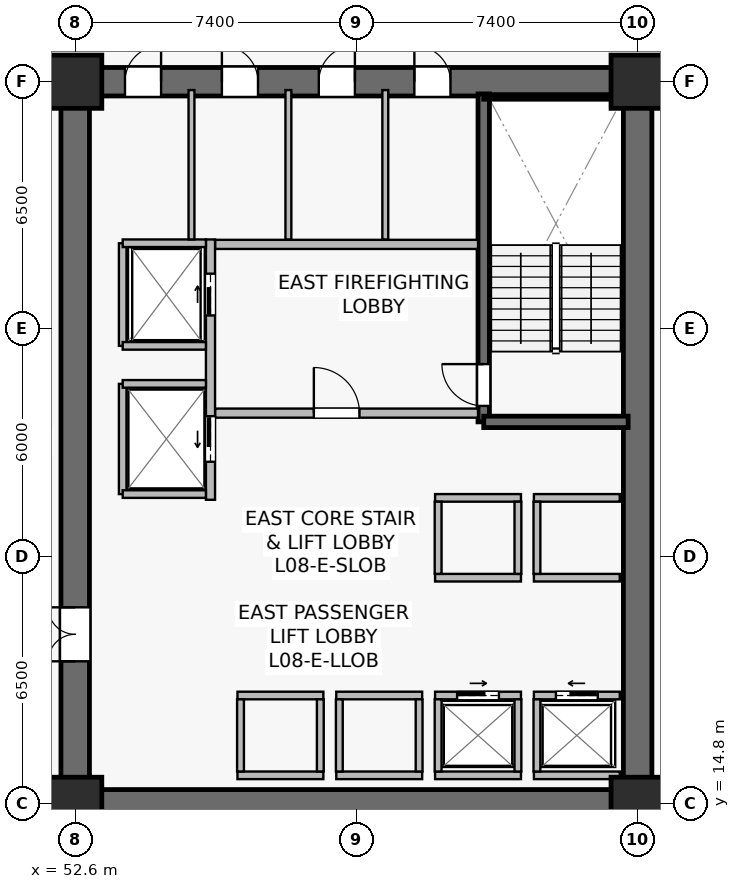
"""IFC4 building model, lengths in metres.
Left out: names, types, materials, properties, quantities, classifications, styles, units other than length and angle.
Written with IfcOpenShell. Run it as: python <this file> out.ifc"""

import sys

from ifc_helpers import new_model, si_unit, direction, frame, frame_2d, origin, origin_2d, place, context, subcontext, project, spatial, rectangle, extrude, source, transform, mapped, element, fill, save


model = new_model("IFC4")
c1 = context("Model", 3, precision=1e-05, world=origin(), true_north=direction((0.0, 1.0)))
c2 = subcontext(c1, "Body", "Model", "MODEL_VIEW")
j1 = project(units=[si_unit("LENGTHUNIT", "METRE"), si_unit("PLANEANGLEUNIT", "RADIAN")], contexts=[c1])
p1 = place(None, origin())
s1 = spatial("IfcSite", under=j1, at=p1, CompositionType="ELEMENT")
p2 = place(p1, origin())
s2 = spatial("IfcBuilding", under=s1, at=p2, CompositionType="ELEMENT")
p3 = place(p2, frame((0.0, 0.0, 33.4)))
s3 = spatial("IfcBuildingStorey", under=s2, at=p3, CompositionType="ELEMENT", Elevation=33.4)
p4 = place(p3, frame((52.225, 14.8, 0.0), z_axis=(0.0, 0.0, 1.0), x_axis=(1.0, 0.0, 0.0)))
e1 = element("IfcWall", 1, at=p4, inside=s3, PredefinedType="SHEAR", context=c2, shape_type="SweptSolid", body=[
    extrude(rectangle(XDim=15.55, YDim=0.75, at=frame_2d((7.775, 0.0))), origin(), (0.0, 0.0, 1.0), 3.78),
])
p5 = place(p3, frame((52.225, 33.8, 0.0), z_axis=(0.0, 0.0, 1.0), x_axis=(1.0, 0.0, 0.0)))
e2 = element("IfcWall", 2, at=p5, inside=s3, PredefinedType="SHEAR", context=c2, shape_type="SweptSolid", body=[
    extrude(rectangle(XDim=15.55, YDim=0.75, at=frame_2d((7.775, 0.0))), origin(), (0.0, 0.0, 1.0), 3.78),
])
p6 = place(p5, frame((9.3, 0.0, 0.0)))
e3 = element("IfcOpeningElement", 3, at=p6, cuts=e2, PredefinedType="OPENING", context=c2, shape_type="SweptSolid", body=[
    extrude(rectangle(XDim=0.95, YDim=2.15, at=frame_2d((0.475, 1.075))), frame((0.0, 0.385, 0.0), z_axis=(0.0, -1.0, 0.0), x_axis=(1.0, 0.0, 0.0)), (0.0, 0.0, 1.0), 0.77),
])
p7 = place(p5, frame((6.785, 0.0, 0.0)))
e4 = element("IfcOpeningElement", 4, at=p7, cuts=e2, PredefinedType="OPENING", context=c2, shape_type="SweptSolid", body=[
    extrude(rectangle(XDim=0.95, YDim=2.15, at=frame_2d((0.475, 1.075))), frame((0.0, 0.385, 0.0), z_axis=(0.0, -1.0, 0.0), x_axis=(1.0, 0.0, 0.0)), (0.0, 0.0, 1.0), 0.77),
])
p8 = place(p5, frame((4.235, 0.0, 0.0)))
e5 = element("IfcOpeningElement", 5, at=p8, cuts=e2, PredefinedType="OPENING", context=c2, shape_type="SweptSolid", body=[
    extrude(rectangle(XDim=0.95, YDim=2.15, at=frame_2d((0.475, 1.075))), frame((0.0, 0.385, 0.0), z_axis=(0.0, -1.0, 0.0), x_axis=(1.0, 0.0, 0.0)), (0.0, 0.0, 1.0), 0.77),
])
p9 = place(p5, frame((1.685, 0.0, 0.0)))
e6 = element("IfcOpeningElement", 6, at=p9, cuts=e2, PredefinedType="OPENING", context=c2, shape_type="SweptSolid", body=[
    extrude(rectangle(XDim=0.95, YDim=2.15, at=frame_2d((0.475, 1.075))), frame((0.0, 0.385, 0.0), z_axis=(0.0, -1.0, 0.0), x_axis=(1.0, 0.0, 0.0)), (0.0, 0.0, 1.0), 0.77),
])
p10 = place(p3, frame((52.6, 15.175, 0.0), z_axis=(0.0, 0.0, 1.0), x_axis=(0.0, 1.0, 0.0)))
e7 = element("IfcWall", 7, at=p10, inside=s3, PredefinedType="SHEAR", context=c2, shape_type="SweptSolid", body=[
    extrude(rectangle(XDim=18.25, YDim=0.75, at=frame_2d((9.125, 0.0))), origin(), (0.0, 0.0, 1.0), 3.78),
])
p11 = place(p10, frame((3.375, 0.0, 0.0)))
e8 = element("IfcOpeningElement", 8, at=p11, cuts=e7, PredefinedType="OPENING", context=c2, shape_type="SweptSolid", body=[
    extrude(rectangle(XDim=1.42, YDim=2.2, at=frame_2d((0.71, 1.1))), frame((0.0, 0.385, 0.0), z_axis=(0.0, -1.0, 0.0), x_axis=(1.0, 0.0, 0.0)), (0.0, 0.0, 1.0), 0.77),
])
p12 = place(p3, frame((67.4, 15.175, 0.0), z_axis=(0.0, 0.0, 1.0), x_axis=(0.0, 1.0, 0.0)))
e9 = element("IfcWall", 9, at=p12, inside=s3, PredefinedType="SHEAR", context=c2, shape_type="SweptSolid", body=[
    extrude(rectangle(XDim=18.25, YDim=0.75, at=frame_2d((9.125, 0.0))), origin(), (0.0, 0.0, 1.0), 3.78),
])
p13 = place(p3, frame((63.35, 24.85, 0.0), z_axis=(0.0, 0.0, 1.0), x_axis=(0.0, 1.0, 0.0)))
e10 = element("IfcWall", 10, at=p13, inside=s3, PredefinedType="SHEAR", context=c2, shape_type="SweptSolid", body=[
    extrude(rectangle(XDim=8.63, YDim=0.3, at=frame_2d((4.315, 0.0))), origin(), (0.0, 0.0, 1.0), 3.78),
])
p14 = place(p13, frame((0.42, 0.0, 0.0)))
e11 = element("IfcOpeningElement", 11, at=p14, cuts=e10, PredefinedType="OPENING", context=c2, shape_type="SweptSolid", body=[
    extrude(rectangle(XDim=1.1, YDim=2.15, at=frame_2d((0.55, 1.075))), frame((0.0, 0.16, 0.0), z_axis=(0.0, -1.0, 0.0), x_axis=(1.0, 0.0, 0.0)), (0.0, 0.0, 1.0), 0.32),
])
p15 = place(p3, frame((63.35, 24.85, 0.0), z_axis=(0.0, 0.0, 1.0), x_axis=(1.0, 0.0, 0.0)))
e12 = element("IfcWall", 12, at=p15, inside=s3, PredefinedType="SHEAR", context=c2, shape_type="SweptSolid", body=[
    extrude(rectangle(XDim=3.8, YDim=0.3, at=frame_2d((1.9, 0.0))), origin(), (0.0, 0.0, 1.0), 3.78),
])
p16 = place(p3, frame((63.35, 33.4, 0.0), z_axis=(0.0, 0.0, 1.0), x_axis=(1.0, 0.0, 0.0)))
e13 = element("IfcWall", 13, at=p16, inside=s3, PredefinedType="SOLIDWALL", context=c2, shape_type="SweptSolid", body=[
    extrude(rectangle(XDim=3.72, YDim=0.12, at=frame_2d((1.86, 0.0))), origin(), (0.0, 0.0, 1.0), 3.78),
])
m1 = source(origin(), c2, "Body", "SweptSolid", [
    extrude(rectangle(XDim=1.4, YDim=1.4, at=origin_2d()), origin(), (0.0, 0.0, 1.0), 4.1),
])
for number, where, z_axis, x_axis in (
    (14, (52.6, 14.8, 0.0), (0.0, 0.0, 1.0), (1.0, 0.0, 0.0)),
    (15, (67.4, 14.8, 0.0), (0.0, 0.0, 1.0), (1.0, 0.0, 0.0)),
    (16, (52.6, 33.8, 0.0), (0.0, 0.0, 1.0), (1.0, 0.0, 0.0)),
    (17, (67.4, 33.8, 0.0), (0.0, 0.0, 1.0), (1.0, 0.0, 0.0)),
):
    element("IfcColumn", number, at=place(p3, frame(where, z_axis=z_axis, x_axis=x_axis)), inside=s3, PredefinedType="COLUMN", context=c2, shape_type="MappedRepresentation", body=[
        mapped(m1, transform((0.0, 0.0, 0.0), scale=1.0)),
    ])
p17 = place(p3, frame((56.28, 25.08, 0.0), z_axis=(0.0, 0.0, 1.0), x_axis=(1.0, 0.0, 0.0)))
e18 = element("IfcWall", 18, at=p17, inside=s3, PredefinedType="SOLIDWALL", context=c2, shape_type="SweptSolid", body=[
    extrude(rectangle(XDim=6.92, YDim=0.24, at=frame_2d((3.46, 0.0))), origin(), (0.0, 0.0, 1.0), 3.065),
])
p18 = place(p17, frame((2.6, 0.0, 0.0)))
e19 = element("IfcOpeningElement", 19, at=p18, cuts=e18, PredefinedType="OPENING", context=c2, shape_type="SweptSolid", body=[
    extrude(rectangle(XDim=1.2, YDim=2.16, at=frame_2d((0.6, 1.08))), frame((0.0, 0.13, 0.0), z_axis=(0.0, -1.0, 0.0), x_axis=(1.0, 0.0, 0.0)), (0.0, 0.0, 1.0), 0.26),
])
p19 = place(p3, frame((56.28, 29.52, 0.0), z_axis=(0.0, 0.0, 1.0), x_axis=(1.0, 0.0, 0.0)))
e20 = element("IfcWall", 20, at=p19, inside=s3, PredefinedType="SOLIDWALL", context=c2, shape_type="SweptSolid", body=[
    extrude(rectangle(XDim=6.92, YDim=0.24, at=frame_2d((3.46, 0.0))), origin(), (0.0, 0.0, 1.0), 3.065),
])
p20 = place(p3, frame((56.16, 22.8, 0.0), z_axis=(0.0, 0.0, 1.0), x_axis=(0.0, 1.0, 0.0)))
e21 = element("IfcWall", 21, at=p20, inside=s3, PredefinedType="SOLIDWALL", context=c2, shape_type="SweptSolid", body=[
    extrude(rectangle(XDim=6.85, YDim=0.24, at=frame_2d((3.425, 0.0))), origin(), (0.0, 0.0, 1.0), 2.865),
])
p21 = place(p20, frame((4.85, 0.0, 0.0)))
e22 = element("IfcOpeningElement", 22, at=p21, cuts=e21, PredefinedType="OPENING", context=c2, shape_type="SweptSolid", body=[
    extrude(rectangle(XDim=1.1, YDim=2.22, at=frame_2d((0.55, 1.11))), frame((0.0, 0.13, 0.0), z_axis=(0.0, -1.0, 0.0), x_axis=(1.0, 0.0, 0.0)), (0.0, 0.0, 1.0), 0.26),
])
p22 = place(p20, frame((1.0, 0.0, 0.0)))
e23 = element("IfcOpeningElement", 23, at=p22, cuts=e21, PredefinedType="OPENING", context=c2, shape_type="SweptSolid", body=[
    extrude(rectangle(XDim=1.2, YDim=2.22, at=frame_2d((0.6, 1.11))), frame((0.0, 0.13, 0.0), z_axis=(0.0, -1.0, 0.0), x_axis=(1.0, 0.0, 0.0)), (0.0, 0.0, 1.0), 0.26),
])
p23 = place(p3, frame((64.67, 17.65, 0.0), z_axis=(0.0, 0.0, 1.0), x_axis=(1.0, 0.0, 0.0)))
e24 = element("IfcWall", 24, at=p23, inside=s3, PredefinedType="SOLIDWALL", context=c2, shape_type="SweptSolid", body=[
    extrude(rectangle(XDim=2.26, YDim=0.2, at=frame_2d((1.13, 0.0))), origin(), (0.0, 0.0, 1.0), 3.78),
])
p24 = place(p23, frame((0.58, 0.0, 0.0)))
e25 = element("IfcOpeningElement", 25, at=p24, cuts=e24, PredefinedType="OPENING", context=c2, shape_type="SweptSolid", body=[
    extrude(rectangle(XDim=1.1, YDim=2.22, at=frame_2d((0.55, 1.11))), frame((0.0, 0.11, 0.0), z_axis=(0.0, -1.0, 0.0), x_axis=(1.0, 0.0, 0.0)), (0.0, 0.0, 1.0), 0.22),
])
p25 = place(p3, frame((64.67, 15.55, 0.0), z_axis=(0.0, 0.0, 1.0), x_axis=(1.0, 0.0, 0.0)))
e26 = element("IfcWall", 26, at=p25, inside=s3, PredefinedType="SOLIDWALL", context=c2, shape_type="SweptSolid", body=[
    extrude(rectangle(XDim=2.26, YDim=0.2, at=frame_2d((1.13, 0.0))), origin(), (0.0, 0.0, 1.0), 3.78),
])
p26 = place(p3, frame((64.75, 15.65, 0.0), z_axis=(0.0, 0.0, 1.0), x_axis=(0.0, 1.0, 0.0)))
e27 = element("IfcWall", 27, at=p26, inside=s3, PredefinedType="SOLIDWALL", context=c2, shape_type="SweptSolid", body=[
    extrude(rectangle(XDim=1.9, YDim=0.18, at=frame_2d((0.95, 0.0))), origin(), (0.0, 0.0, 1.0), 3.78),
])
p27 = place(p3, frame((62.07, 17.65, 0.0), z_axis=(0.0, 0.0, 1.0), x_axis=(1.0, 0.0, 0.0)))
e28 = element("IfcWall", 28, at=p27, inside=s3, PredefinedType="SOLIDWALL", context=c2, shape_type="SweptSolid", body=[
    extrude(rectangle(XDim=2.26, YDim=0.2, at=frame_2d((1.13, 0.0))), origin(), (0.0, 0.0, 1.0), 3.78),
])
p28 = place(p27, frame((0.58, 0.0, 0.0)))
e29 = element("IfcOpeningElement", 29, at=p28, cuts=e28, PredefinedType="OPENING", context=c2, shape_type="SweptSolid", body=[
    extrude(rectangle(XDim=1.1, YDim=2.22, at=frame_2d((0.55, 1.11))), frame((0.0, 0.11, 0.0), z_axis=(0.0, -1.0, 0.0), x_axis=(1.0, 0.0, 0.0)), (0.0, 0.0, 1.0), 0.22),
])
p29 = place(p3, frame((62.07, 15.55, 0.0), z_axis=(0.0, 0.0, 1.0), x_axis=(1.0, 0.0, 0.0)))
e30 = element("IfcWall", 30, at=p29, inside=s3, PredefinedType="SOLIDWALL", context=c2, shape_type="SweptSolid", body=[
    extrude(rectangle(XDim=2.26, YDim=0.2, at=frame_2d((1.13, 0.0))), origin(), (0.0, 0.0, 1.0), 3.78),
])
for number, where, z_axis, x_axis in (
    (31, (62.15, 15.65, 0.0), (0.0, 0.0, 1.0), (0.0, 1.0, 0.0)),
    (32, (64.25, 15.65, 0.0), (0.0, 0.0, 1.0), (0.0, 1.0, 0.0)),
):
    element("IfcWall", number, at=place(p3, frame(where, z_axis=z_axis, x_axis=x_axis)), inside=s3, PredefinedType="SOLIDWALL", context=c2, shape_type="SweptSolid", body=[
        extrude(rectangle(XDim=1.9, YDim=0.18, at=frame_2d((0.95, 0.0))), origin(), (0.0, 0.0, 1.0), 3.78),
    ])
for number, where, z_axis, x_axis in (
    (33, (59.47, 17.65, 0.0), (0.0, 0.0, 1.0), (1.0, 0.0, 0.0)),
    (34, (59.47, 15.55, 0.0), (0.0, 0.0, 1.0), (1.0, 0.0, 0.0)),
):
    element("IfcWall", number, at=place(p3, frame(where, z_axis=z_axis, x_axis=x_axis)), inside=s3, PredefinedType="SOLIDWALL", context=c2, shape_type="SweptSolid", body=[
        extrude(rectangle(XDim=2.26, YDim=0.2, at=frame_2d((1.13, 0.0))), origin(), (0.0, 0.0, 1.0), 3.065),
    ])
for number, where, z_axis, x_axis in (
    (35, (59.55, 15.65, 0.0), (0.0, 0.0, 1.0), (0.0, 1.0, 0.0)),
    (36, (61.65, 15.65, 0.0), (0.0, 0.0, 1.0), (0.0, 1.0, 0.0)),
):
    element("IfcWall", number, at=place(p3, frame(where, z_axis=z_axis, x_axis=x_axis)), inside=s3, PredefinedType="SOLIDWALL", context=c2, shape_type="SweptSolid", body=[
        extrude(rectangle(XDim=1.9, YDim=0.18, at=frame_2d((0.95, 0.0))), origin(), (0.0, 0.0, 1.0), 3.78),
    ])
for number, where, z_axis, x_axis in (
    (37, (56.87, 17.65, 0.0), (0.0, 0.0, 1.0), (1.0, 0.0, 0.0)),
    (38, (56.87, 15.55, 0.0), (0.0, 0.0, 1.0), (1.0, 0.0, 0.0)),
):
    element("IfcWall", number, at=place(p3, frame(where, z_axis=z_axis, x_axis=x_axis)), inside=s3, PredefinedType="SOLIDWALL", context=c2, shape_type="SweptSolid", body=[
        extrude(rectangle(XDim=2.26, YDim=0.2, at=frame_2d((1.13, 0.0))), origin(), (0.0, 0.0, 1.0), 3.78),
    ])
for number, where, z_axis, x_axis in (
    (39, (56.95, 15.65, 0.0), (0.0, 0.0, 1.0), (0.0, 1.0, 0.0)),
    (40, (59.05, 15.65, 0.0), (0.0, 0.0, 1.0), (0.0, 1.0, 0.0)),
):
    element("IfcWall", number, at=place(p3, frame(where, z_axis=z_axis, x_axis=x_axis)), inside=s3, PredefinedType="SOLIDWALL", context=c2, shape_type="SweptSolid", body=[
        extrude(rectangle(XDim=1.9, YDim=0.18, at=frame_2d((0.95, 0.0))), origin(), (0.0, 0.0, 1.0), 3.78),
    ])
for number, where, z_axis, x_axis in (
    (41, (64.67, 20.75, 0.0), (0.0, 0.0, 1.0), (1.0, 0.0, 0.0)),
    (42, (64.67, 22.85, 0.0), (0.0, 0.0, 1.0), (1.0, 0.0, 0.0)),
):
    element("IfcWall", number, at=place(p3, frame(where, z_axis=z_axis, x_axis=x_axis)), inside=s3, PredefinedType="SOLIDWALL", context=c2, shape_type="SweptSolid", body=[
        extrude(rectangle(XDim=2.26, YDim=0.2, at=frame_2d((1.13, 0.0))), origin(), (0.0, 0.0, 1.0), 3.78),
    ])
p30 = place(p3, frame((64.75, 20.85, 0.0), z_axis=(0.0, 0.0, 1.0), x_axis=(0.0, 1.0, 0.0)))
e43 = element("IfcWall", 43, at=p30, inside=s3, PredefinedType="SOLIDWALL", context=c2, shape_type="SweptSolid", body=[
    extrude(rectangle(XDim=1.9, YDim=0.18, at=frame_2d((0.95, 0.0))), origin(), (0.0, 0.0, 1.0), 3.78),
])
for number, where, z_axis, x_axis in (
    (44, (62.07, 20.75, 0.0), (0.0, 0.0, 1.0), (1.0, 0.0, 0.0)),
    (45, (62.07, 22.85, 0.0), (0.0, 0.0, 1.0), (1.0, 0.0, 0.0)),
):
    element("IfcWall", number, at=place(p3, frame(where, z_axis=z_axis, x_axis=x_axis)), inside=s3, PredefinedType="SOLIDWALL", context=c2, shape_type="SweptSolid", body=[
        extrude(rectangle(XDim=2.26, YDim=0.2, at=frame_2d((1.13, 0.0))), origin(), (0.0, 0.0, 1.0), 3.78),
    ])
for number, where, z_axis, x_axis in (
    (46, (62.15, 20.85, 0.0), (0.0, 0.0, 1.0), (0.0, 1.0, 0.0)),
    (47, (64.25, 20.85, 0.0), (0.0, 0.0, 1.0), (0.0, 1.0, 0.0)),
):
    element("IfcWall", number, at=place(p3, frame(where, z_axis=z_axis, x_axis=x_axis)), inside=s3, PredefinedType="SOLIDWALL", context=c2, shape_type="SweptSolid", body=[
        extrude(rectangle(XDim=1.9, YDim=0.18, at=frame_2d((0.95, 0.0))), origin(), (0.0, 0.0, 1.0), 3.78),
    ])
p31 = place(p3, frame((53.85, 26.85, 0.0), z_axis=(0.0, 0.0, 1.0), x_axis=(0.0, 1.0, 0.0)))
e48 = element("IfcWall", 48, at=p31, inside=s3, PredefinedType="SOLIDWALL", context=c2, shape_type="SweptSolid", body=[
    extrude(rectangle(XDim=2.7, YDim=0.2, at=frame_2d((1.35, 0.0))), origin(), (0.0, 0.0, 1.0), 3.78),
])
p32 = place(p3, frame((53.85, 29.55, 0.0), z_axis=(0.0, 0.0, 1.0), x_axis=(1.0, 0.0, 0.0)))
e49 = element("IfcWall", 49, at=p32, inside=s3, PredefinedType="SOLIDWALL", context=c2, shape_type="SweptSolid", body=[
    extrude(rectangle(XDim=2.19, YDim=0.2, at=frame_2d((1.095, 0.0))), origin(), (0.0, 0.0, 1.0), 3.78),
])
p33 = place(p3, frame((53.85, 26.85, 0.0), z_axis=(0.0, 0.0, 1.0), x_axis=(1.0, 0.0, 0.0)))
e50 = element("IfcWall", 50, at=p33, inside=s3, PredefinedType="SOLIDWALL", context=c2, shape_type="SweptSolid", body=[
    extrude(rectangle(XDim=2.19, YDim=0.2, at=frame_2d((1.095, 0.0))), origin(), (0.0, 0.0, 1.0), 3.177),
])
p34 = place(p3, frame((53.85, 22.95, 0.0), z_axis=(0.0, 0.0, 1.0), x_axis=(0.0, 1.0, 0.0)))
e51 = element("IfcWall", 51, at=p34, inside=s3, PredefinedType="SOLIDWALL", context=c2, shape_type="SweptSolid", body=[
    extrude(rectangle(XDim=2.9, YDim=0.2, at=frame_2d((1.45, 0.0))), origin(), (0.0, 0.0, 1.0), 2.865),
])
for number, where, z_axis, x_axis in (
    (52, (53.85, 25.85, 0.0), (0.0, 0.0, 1.0), (1.0, 0.0, 0.0)),
    (53, (53.85, 22.95, 0.0), (0.0, 0.0, 1.0), (1.0, 0.0, 0.0)),
):
    element("IfcWall", number, at=place(p3, frame(where, z_axis=z_axis, x_axis=x_axis)), inside=s3, PredefinedType="SOLIDWALL", context=c2, shape_type="SweptSolid", body=[
        extrude(rectangle(XDim=2.19, YDim=0.2, at=frame_2d((1.095, 0.0))), origin(), (0.0, 0.0, 1.0), 3.78),
    ])
for number, where, z_axis, x_axis in (
    (54, (60.76, 29.65, 0.0), (0.0, 0.0, 1.0), (0.0, 1.0, 0.0)),
    (55, (58.21, 29.65, 0.0), (0.0, 0.0, 1.0), (0.0, 1.0, 0.0)),
    (56, (55.66, 29.65, 0.0), (0.0, 0.0, 1.0), (0.0, 1.0, 0.0)),
):
    element("IfcWall", number, at=place(p3, frame(where, z_axis=z_axis, x_axis=x_axis)), inside=s3, PredefinedType="PLUMBINGWALL", context=c2, shape_type="SweptSolid", body=[
        extrude(rectangle(XDim=3.93, YDim=0.155, at=frame_2d((1.965, 0.0))), origin(), (0.0, 0.0, 1.0), 3.78),
    ])
m2 = source(origin(), c2, "Body", "SweptSolid", [
    extrude(rectangle(XDim=1.1, YDim=2.15, at=frame_2d((0.55, 1.075))), frame((0.0, 0.025, 0.0), z_axis=(0.0, -1.0, 0.0), x_axis=(1.0, 0.0, 0.0)), (0.0, 0.0, 1.0), 0.05),
])
p35 = place(p14, origin())
e57 = element("IfcDoor", 57, at=p35, inside=s3, OperationType="SINGLE_SWING_RIGHT", PredefinedType="DOOR", context=c2, shape_type="MappedRepresentation", body=[
    mapped(m2, transform((0.0, 0.0, 0.0), scale=1.0)),
])
fill(e11, e57)
m3 = source(origin(), c2, "Body", "SweptSolid", [
    extrude(rectangle(XDim=1.2, YDim=2.16, at=frame_2d((0.6, 1.08))), frame((0.0, 0.025, 0.0), z_axis=(0.0, -1.0, 0.0), x_axis=(1.0, 0.0, 0.0)), (0.0, 0.0, 1.0), 0.05),
])
p36 = place(p18, origin())
e58 = element("IfcDoor", 58, at=p36, inside=s3, OperationType="SINGLE_SWING_LEFT", PredefinedType="DOOR", context=c2, shape_type="MappedRepresentation", body=[
    mapped(m3, transform((0.0, 0.0, 0.0), scale=1.0)),
])
fill(e19, e58)
m4 = source(origin(), c2, "Body", "SweptSolid", [
    extrude(rectangle(XDim=1.1, YDim=2.22, at=frame_2d((0.55, 1.11))), frame((0.0, 0.025, 0.0), z_axis=(0.0, -1.0, 0.0), x_axis=(1.0, 0.0, 0.0)), (0.0, 0.0, 1.0), 0.05),
])
p37 = place(p24, origin())
e59 = element("IfcDoor", 59, at=p37, inside=s3, OperationType="SLIDING_TO_LEFT", PredefinedType="USERDEFINED", context=c2, shape_type="MappedRepresentation", body=[
    mapped(m4, transform((0.0, 0.0, 0.0), scale=1.0)),
])
fill(e25, e59)
p38 = place(p28, origin())
e60 = element("IfcDoor", 60, at=p38, inside=s3, OperationType="SLIDING_TO_RIGHT", PredefinedType="USERDEFINED", context=c2, shape_type="MappedRepresentation", body=[
    mapped(m4, transform((0.0, 0.0, 0.0), scale=1.0)),
])
fill(e29, e60)
p39 = place(p21, origin())
e61 = element("IfcDoor", 61, at=p39, inside=s3, OperationType="SLIDING_TO_RIGHT", PredefinedType="USERDEFINED", context=c2, shape_type="MappedRepresentation", body=[
    mapped(m4, transform((0.0, 0.0, 0.0), scale=1.0)),
])
fill(e22, e61)
m5 = source(origin(), c2, "Body", "SweptSolid", [
    extrude(rectangle(XDim=1.2, YDim=2.22, at=frame_2d((0.6, 1.11))), frame((0.0, 0.025, 0.0), z_axis=(0.0, -1.0, 0.0), x_axis=(1.0, 0.0, 0.0)), (0.0, 0.0, 1.0), 0.05),
])
p40 = place(p22, origin())
e62 = element("IfcDoor", 62, at=p40, inside=s3, OperationType="SLIDING_TO_LEFT", PredefinedType="USERDEFINED", context=c2, shape_type="MappedRepresentation", body=[
    mapped(m5, transform((0.0, 0.0, 0.0), scale=1.0)),
])
fill(e23, e62)
m6 = source(origin(), c2, "Body", "SweptSolid", [
    extrude(rectangle(XDim=1.42, YDim=2.2, at=frame_2d((0.71, 1.1))), frame((0.0, 0.025, 0.0), z_axis=(0.0, -1.0, 0.0), x_axis=(1.0, 0.0, 0.0)), (0.0, 0.0, 1.0), 0.05),
])
p41 = place(p11, origin())
e63 = element("IfcDoor", 63, at=p41, inside=s3, OperationType="DOUBLE_DOOR_SINGLE_SWING", PredefinedType="DOOR", context=c2, shape_type="MappedRepresentation", body=[
    mapped(m6, transform((0.0, 0.0, 0.0), scale=1.0)),
])
fill(e8, e63)
m7 = source(origin(), c2, "Body", "SweptSolid", [
    extrude(rectangle(XDim=0.95, YDim=2.15, at=frame_2d((0.475, 1.075))), frame((0.0, 0.025, 0.0), z_axis=(0.0, -1.0, 0.0), x_axis=(1.0, 0.0, 0.0)), (0.0, 0.0, 1.0), 0.05),
])
p42 = place(p6, origin())
e64 = element("IfcDoor", 64, at=p42, inside=s3, OperationType="SINGLE_SWING_LEFT", PredefinedType="DOOR", context=c2, shape_type="MappedRepresentation", body=[
    mapped(m7, transform((0.0, 0.0, 0.0), scale=1.0)),
])
fill(e3, e64)
p43 = place(p7, origin())
e65 = element("IfcDoor", 65, at=p43, inside=s3, OperationType="SINGLE_SWING_RIGHT", PredefinedType="DOOR", context=c2, shape_type="MappedRepresentation", body=[
    mapped(m7, transform((0.0, 0.0, 0.0), scale=1.0)),
])
fill(e4, e65)
p44 = place(p8, origin())
e66 = element("IfcDoor", 66, at=p44, inside=s3, OperationType="SINGLE_SWING_LEFT", PredefinedType="DOOR", context=c2, shape_type="MappedRepresentation", body=[
    mapped(m7, transform((0.0, 0.0, 0.0), scale=1.0)),
])
fill(e5, e66)
p45 = place(p9, origin())
e67 = element("IfcDoor", 67, at=p45, inside=s3, OperationType="SINGLE_SWING_RIGHT", PredefinedType="DOOR", context=c2, shape_type="MappedRepresentation", body=[
    mapped(m7, transform((0.0, 0.0, 0.0), scale=1.0)),
])
fill(e6, e67)
save(model, sys.argv[1])
